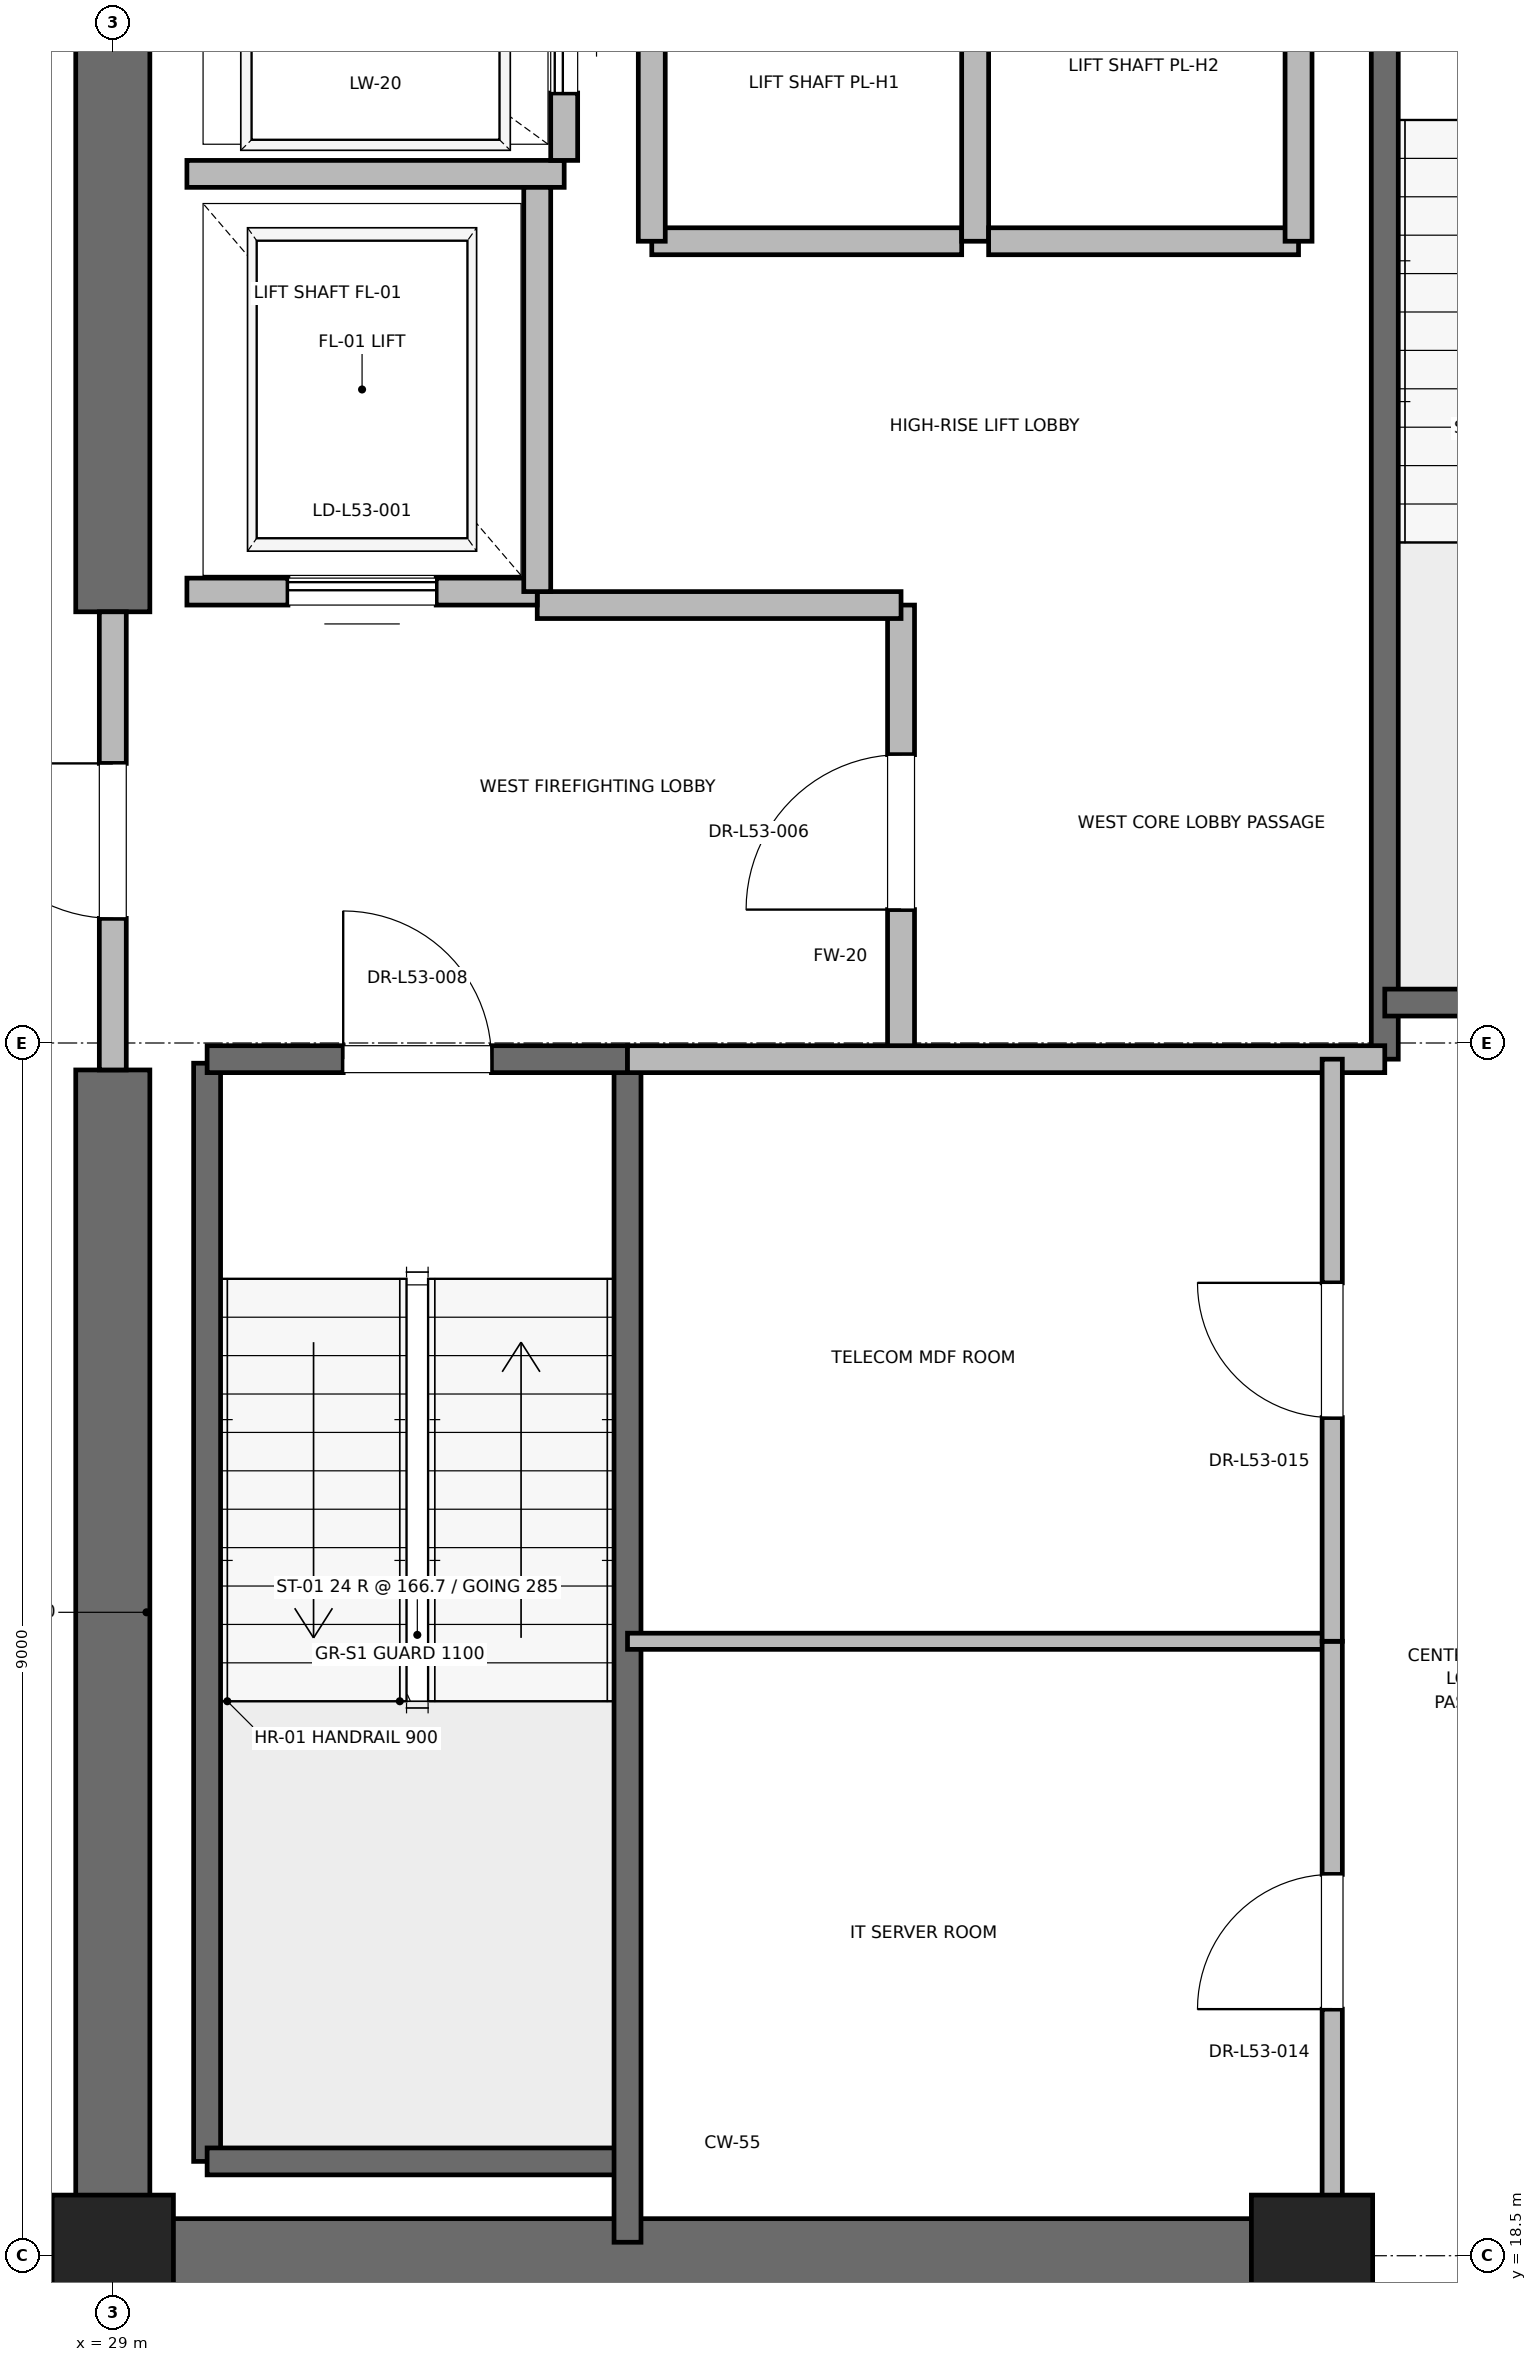
"""IFC4 building model, lengths in metres.
Left out: names, types, materials, properties, quantities, classifications, styles, units other than length and angle.
Written with IfcOpenShell. Run it as: python <this file> out.ifc"""

import sys

from ifc_helpers import new_model, si_unit, direction, frame, frame_2d, origin, origin_2d, place, context, subcontext, project, spatial, rectangle, extrude, element, fill, save


model = new_model("IFC4")
c1 = context("Model", 3, precision=1e-05, world=origin(), true_north=direction((0.0, 1.0)))
c2 = subcontext(c1, "Body", "Model", "MODEL_VIEW")
j1 = project(units=[si_unit("LENGTHUNIT", "METRE"), si_unit("PLANEANGLEUNIT", "RADIAN")], contexts=[c1])
p1 = place(None, origin())
s1 = spatial("IfcSite", under=j1, at=p1, CompositionType="ELEMENT")
p2 = place(p1, origin())
s2 = spatial("IfcBuilding", under=s1, at=p2, CompositionType="ELEMENT")
p3 = place(p2, frame((0.0, 0.0, 229.2)))
s3 = spatial("IfcBuildingStorey", under=s2, at=p3, CompositionType="ELEMENT", Elevation=229.2)
for number, where, z_axis, x_axis in (
    (1, (29.0, 18.5, 0.0), (0.0, 0.0, 1.0), (1.0, 0.0, 0.0)),
    (2, (37.9, 18.5, 0.0), (0.0, 0.0, 1.0), (1.0, 0.0, 0.0)),
):
    element("IfcColumn", number, at=place(p3, frame(where, z_axis=z_axis, x_axis=x_axis)), inside=s3, PredefinedType="PILASTER", context=c2, shape_type="SweptSolid", body=[
        extrude(rectangle(XDim=0.9, YDim=0.9, at=origin_2d()), origin(), (0.0, 0.0, 1.0), 4.0),
    ])
p4 = place(p3, frame((29.0, 18.5, 0.0), z_axis=(0.0, 0.0, 1.0), x_axis=(1.0, 0.0, 0.0)))
e3 = element("IfcWall", 3, at=p4, inside=s3, PredefinedType="SHEAR", context=c2, shape_type="SweptSolid", body=[
    extrude(rectangle(XDim=9.2, YDim=0.55, at=frame_2d((4.6, 0.0))), origin(), (0.0, 0.0, 1.0), 3.7),
])
p5 = place(p3, frame((29.0, 18.5, 0.0), z_axis=(0.0, 0.0, 1.0), x_axis=(0.0, 1.0, 0.0)))
e4 = element("IfcWall", 4, at=p5, inside=s3, PredefinedType="SHEAR", context=c2, shape_type="SweptSolid", body=[
    extrude(rectangle(XDim=8.8, YDim=0.55, at=frame_2d((4.4, 0.0))), origin(), (0.0, 0.0, 1.0), 3.7),
])
p6 = place(p3, frame((29.0, 30.7, 0.0), z_axis=(0.0, 0.0, 1.0), x_axis=(0.0, 1.0, 0.0)))
e5 = element("IfcWall", 5, at=p6, inside=s3, PredefinedType="SHEAR", context=c2, shape_type="SweptSolid", body=[
    extrude(rectangle(XDim=5.8, YDim=0.55, at=frame_2d((2.9, 0.0))), origin(), (0.0, 0.0, 1.0), 3.7),
])
p7 = place(p3, frame((29.7, 19.2, 0.0), z_axis=(0.0, 0.0, 1.0), x_axis=(0.0, 1.0, 0.0)))
e6 = element("IfcWall", 6, at=p7, inside=s3, PredefinedType="SOLIDWALL", context=c2, shape_type="SweptSolid", body=[
    extrude(rectangle(XDim=8.15, YDim=0.2, at=frame_2d((4.075, 0.0))), origin(), (0.0, 0.0, 1.0), 3.7),
])
p8 = place(p3, frame((29.7, 19.2, 0.0), z_axis=(0.0, 0.0, 1.0), x_axis=(1.0, 0.0, 0.0)))
e7 = element("IfcWall", 7, at=p8, inside=s3, PredefinedType="SOLIDWALL", context=c2, shape_type="SweptSolid", body=[
    extrude(rectangle(XDim=3.12, YDim=0.2, at=frame_2d((1.56, 0.0))), origin(), (0.0, 0.0, 1.0), 3.7),
])
p9 = place(p3, frame((32.82, 18.6, 0.0), z_axis=(0.0, 0.0, 1.0), x_axis=(0.0, 1.0, 0.0)))
e8 = element("IfcWall", 8, at=p9, inside=s3, PredefinedType="SOLIDWALL", context=c2, shape_type="SweptSolid", body=[
    extrude(rectangle(XDim=8.78, YDim=0.2, at=frame_2d((4.39, 0.0))), origin(), (0.0, 0.0, 1.0), 3.7),
])
p10 = place(p3, frame((29.7, 27.38, 0.0), z_axis=(0.0, 0.0, 1.0), x_axis=(1.0, 0.0, 0.0)))
e9 = element("IfcWall", 9, at=p10, inside=s3, PredefinedType="SOLIDWALL", context=c2, shape_type="SweptSolid", body=[
    extrude(rectangle(XDim=3.12, YDim=0.2, at=frame_2d((1.56, 0.0))), origin(), (0.0, 0.0, 1.0), 3.7),
])
p11 = place(p10, frame((1.01, 0.0, 0.0)))
e10 = element("IfcOpeningElement", 10, at=p11, cuts=e9, PredefinedType="OPENING", context=c2, shape_type="SweptSolid", body=[
    extrude(rectangle(XDim=1.1, YDim=2.15, at=frame_2d((0.55, 1.075))), frame((0.0, 0.1, 0.0), z_axis=(0.0, -1.0, 0.0), x_axis=(1.0, 0.0, 0.0)), (0.0, 0.0, 1.0), 0.2),
])
p12 = place(p3, frame((38.44, 27.38, 0.0), z_axis=(0.0, 0.0, 1.0), x_axis=(0.0, 1.0, 0.0)))
e11 = element("IfcWall", 11, at=p12, inside=s3, PredefinedType="SOLIDWALL", context=c2, shape_type="SweptSolid", body=[
    extrude(rectangle(XDim=8.87, YDim=0.2, at=frame_2d((4.435, 0.0))), origin(), (0.0, 0.0, 1.0), 3.7),
])
p13 = place(p3, frame((38.44, 27.8, 0.0), z_axis=(0.0, 0.0, 1.0), x_axis=(1.0, 0.0, 0.0)))
e12 = element("IfcWall", 12, at=p13, inside=s3, PredefinedType="SOLIDWALL", context=c2, shape_type="SweptSolid", body=[
    extrude(rectangle(XDim=3.32, YDim=0.2, at=frame_2d((1.66, 0.0))), origin(), (0.0, 0.0, 1.0), 3.7),
])
p14 = place(p3, frame((34.85, 27.38, 0.0), z_axis=(0.0, 0.0, 1.0), x_axis=(0.0, 1.0, 0.0)))
e13 = element("IfcWall", 13, at=p14, inside=s3, PredefinedType="PARTITIONING", context=c2, shape_type="SweptSolid", body=[
    extrude(rectangle(XDim=3.37, YDim=0.2, at=frame_2d((1.685, 0.0))), origin(), (0.0, 0.0, 1.0), 3.7),
])
p15 = place(p14, frame((1.11, 0.0, 0.0)))
e14 = element("IfcOpeningElement", 14, at=p15, cuts=e13, PredefinedType="OPENING", context=c2, shape_type="SweptSolid", body=[
    extrude(rectangle(XDim=1.15, YDim=2.2, at=frame_2d((0.575, 1.1))), frame((0.0, 0.1, 0.0), z_axis=(0.0, -1.0, 0.0), x_axis=(1.0, 0.0, 0.0)), (0.0, 0.0, 1.0), 0.2),
])
p16 = place(p3, frame((29.0, 27.3, 0.0), z_axis=(0.0, 0.0, 1.0), x_axis=(0.0, 1.0, 0.0)))
e15 = element("IfcWall", 15, at=p16, inside=s3, PredefinedType="PARTITIONING", context=c2, shape_type="SweptSolid", body=[
    extrude(rectangle(XDim=3.4, YDim=0.2, at=frame_2d((1.7, 0.0))), origin(), (0.0, 0.0, 1.0), 2.68),
])
p17 = place(p16, frame((1.125, 0.0, 0.0)))
e16 = element("IfcOpeningElement", 16, at=p17, cuts=e15, PredefinedType="OPENING", context=c2, shape_type="SweptSolid", body=[
    extrude(rectangle(XDim=1.15, YDim=2.2, at=frame_2d((0.575, 1.1))), frame((0.0, 0.1, 0.0), z_axis=(0.0, -1.0, 0.0), x_axis=(1.0, 0.0, 0.0)), (0.0, 0.0, 1.0), 0.2),
])
p18 = place(p3, frame((32.82, 27.38, 0.0), z_axis=(0.0, 0.0, 1.0), x_axis=(1.0, 0.0, 0.0)))
e17 = element("IfcWall", 17, at=p18, inside=s3, PredefinedType="PARTITIONING", context=c2, shape_type="SweptSolid", body=[
    extrude(rectangle(XDim=5.62, YDim=0.2, at=frame_2d((2.81, 0.0))), origin(), (0.0, 0.0, 1.0), 3.7),
])
p19 = place(p3, frame((32.15, 30.75, 0.0), z_axis=(0.0, 0.0, 1.0), x_axis=(1.0, 0.0, 0.0)))
e18 = element("IfcWall", 18, at=p19, inside=s3, PredefinedType="PARTITIONING", context=c2, shape_type="SweptSolid", body=[
    extrude(rectangle(XDim=2.7, YDim=0.2, at=frame_2d((1.35, 0.0))), origin(), (0.0, 0.0, 1.0), 3.7),
])
p20 = place(p3, frame((29.55, 30.85, 0.0), z_axis=(0.0, 0.0, 1.0), x_axis=(1.0, 0.0, 0.0)))
e19 = element("IfcWall", 19, at=p20, inside=s3, PredefinedType="SOLIDWALL", context=c2, shape_type="SweptSolid", body=[
    extrude(rectangle(XDim=2.6, YDim=0.2, at=frame_2d((1.3, 0.0))), origin(), (0.0, 0.0, 1.0), 2.68),
])
p21 = place(p20, frame((0.75, 0.0, 0.0)))
e20 = element("IfcOpeningElement", 20, at=p21, cuts=e19, PredefinedType="OPENING", context=c2, shape_type="SweptSolid", body=[
    extrude(rectangle(XDim=1.1, YDim=2.2, at=frame_2d((0.55, 1.1))), frame((0.0, 0.1, 0.0), z_axis=(0.0, -1.0, 0.0), x_axis=(1.0, 0.0, 0.0)), (0.0, 0.0, 1.0), 0.2),
])
p22 = place(p3, frame((29.55, 33.95, 0.0), z_axis=(0.0, 0.0, 1.0), x_axis=(1.0, 0.0, 0.0)))
e21 = element("IfcWall", 21, at=p22, inside=s3, PredefinedType="SOLIDWALL", context=c2, shape_type="SweptSolid", body=[
    extrude(rectangle(XDim=2.8, YDim=0.2, at=frame_2d((1.4, 0.0))), origin(), (0.0, 0.0, 1.0), 3.7),
])
p23 = place(p3, frame((32.15, 30.85, 0.0), z_axis=(0.0, 0.0, 1.0), x_axis=(0.0, 1.0, 0.0)))
e22 = element("IfcWall", 22, at=p23, inside=s3, PredefinedType="SOLIDWALL", context=c2, shape_type="SweptSolid", body=[
    extrude(rectangle(XDim=3.0, YDim=0.2, at=frame_2d((1.5, 0.0))), origin(), (0.0, 0.0, 1.0), 3.7),
])
p24 = place(p3, frame((32.35, 34.05, 0.0), z_axis=(0.0, 0.0, 1.0), x_axis=(0.0, 1.0, 0.0)))
e23 = element("IfcWall", 23, at=p24, inside=s3, PredefinedType="SOLIDWALL", context=c2, shape_type="SweptSolid", body=[
    extrude(rectangle(XDim=2.1, YDim=0.2, at=frame_2d((1.05, 0.0))), origin(), (0.0, 0.0, 1.0), 3.7),
])
p25 = place(p24, frame((0.5, 0.0, 0.0)))
e24 = element("IfcOpeningElement", 24, at=p25, cuts=e23, PredefinedType="OPENING", context=c2, shape_type="SweptSolid", body=[
    extrude(rectangle(XDim=1.1, YDim=2.2, at=frame_2d((0.55, 1.1))), frame((0.0, 0.1, 0.0), z_axis=(0.0, -1.0, 0.0), x_axis=(1.0, 0.0, 0.0)), (0.0, 0.0, 1.0), 0.2),
])
p26 = place(p3, frame((33.0, 33.45, 0.0), z_axis=(0.0, 0.0, 1.0), x_axis=(1.0, 0.0, 0.0)))
e25 = element("IfcWall", 25, at=p26, inside=s3, PredefinedType="SOLIDWALL", context=c2, shape_type="SweptSolid", body=[
    extrude(rectangle(XDim=2.3, YDim=0.2, at=frame_2d((1.15, 0.0))), origin(), (0.0, 0.0, 1.0), 3.7),
])
p27 = place(p3, frame((33.0, 36.05, 0.0), z_axis=(0.0, 0.0, 1.0), x_axis=(0.0, -1.0, 0.0)))
e26 = element("IfcWall", 26, at=p27, inside=s3, PredefinedType="SOLIDWALL", context=c2, shape_type="SweptSolid", body=[
    extrude(rectangle(XDim=2.6, YDim=0.2, at=frame_2d((1.3, 0.0))), origin(), (0.0, 0.0, 1.0), 3.7),
])
p28 = place(p3, frame((35.4, 33.45, 0.0), z_axis=(0.0, 0.0, 1.0), x_axis=(0.0, 1.0, 0.0)))
e27 = element("IfcWall", 27, at=p28, inside=s3, PredefinedType="SOLIDWALL", context=c2, shape_type="SweptSolid", body=[
    extrude(rectangle(XDim=2.6, YDim=0.2, at=frame_2d((1.3, 0.0))), origin(), (0.0, 0.0, 1.0), 2.68),
])
p29 = place(p3, frame((35.5, 33.45, 0.0), z_axis=(0.0, 0.0, 1.0), x_axis=(1.0, 0.0, 0.0)))
e28 = element("IfcWall", 28, at=p29, inside=s3, PredefinedType="SOLIDWALL", context=c2, shape_type="SweptSolid", body=[
    extrude(rectangle(XDim=2.3, YDim=0.2, at=frame_2d((1.15, 0.0))), origin(), (0.0, 0.0, 1.0), 3.7),
])
p30 = place(p3, frame((37.8, 33.45, 0.0), z_axis=(0.0, 0.0, 1.0), x_axis=(0.0, 1.0, 0.0)))
e29 = element("IfcWall", 29, at=p30, inside=s3, PredefinedType="SOLIDWALL", context=c2, shape_type="SweptSolid", body=[
    extrude(rectangle(XDim=2.6, YDim=0.2, at=frame_2d((1.3, 0.0))), origin(), (0.0, 0.0, 1.0), 2.68),
])
p31 = place(p3, frame((32.82, 23.06, 0.0), z_axis=(0.0, 0.0, 1.0), x_axis=(1.0, 0.0, 0.0)))
e30 = element("IfcWall", 30, at=p31, inside=s3, PredefinedType="PARTITIONING", context=c2, shape_type="SweptSolid", body=[
    extrude(rectangle(XDim=5.23, YDim=0.12, at=frame_2d((2.615, 0.0))), origin(), (0.0, 0.0, 1.0), 2.85),
])
p32 = place(p3, frame((38.05, 18.6, 0.0), z_axis=(0.0, 0.0, 1.0), x_axis=(0.0, 1.0, 0.0)))
e31 = element("IfcWall", 31, at=p32, inside=s3, PredefinedType="PARTITIONING", context=c2, shape_type="SweptSolid", body=[
    extrude(rectangle(XDim=4.46, YDim=0.15, at=frame_2d((2.23, 0.0))), origin(), (0.0, 0.0, 1.0), 2.68),
])
p33 = place(p32, frame((1.73, 0.0, 0.0)))
e32 = element("IfcOpeningElement", 32, at=p33, cuts=e31, PredefinedType="OPENING", context=c2, shape_type="SweptSolid", body=[
    extrude(rectangle(XDim=1.0, YDim=2.15, at=frame_2d((0.5, 1.075))), frame((0.0, 0.075, 0.0), z_axis=(0.0, -1.0, 0.0), x_axis=(1.0, 0.0, 0.0)), (0.0, 0.0, 1.0), 0.15),
])
p34 = place(p3, frame((38.05, 23.06, 0.0), z_axis=(0.0, 0.0, 1.0), x_axis=(0.0, 1.0, 0.0)))
e33 = element("IfcWall", 33, at=p34, inside=s3, PredefinedType="PARTITIONING", context=c2, shape_type="SweptSolid", body=[
    extrude(rectangle(XDim=4.32, YDim=0.15, at=frame_2d((2.16, 0.0))), origin(), (0.0, 0.0, 1.0), 2.85),
])
p35 = place(p34, frame((1.66, 0.0, 0.0)))
e34 = element("IfcOpeningElement", 34, at=p35, cuts=e33, PredefinedType="OPENING", context=c2, shape_type="SweptSolid", body=[
    extrude(rectangle(XDim=1.0, YDim=2.15, at=frame_2d((0.5, 1.075))), frame((0.0, 0.075, 0.0), z_axis=(0.0, -1.0, 0.0), x_axis=(1.0, 0.0, 0.0)), (0.0, 0.0, 1.0), 0.15),
])
p36 = place(p11, origin())
e35 = element("IfcDoor", 35, at=p36, inside=s3, OperationType="SINGLE_SWING_LEFT", PredefinedType="DOOR", context=c2, shape_type="SweptSolid", body=[
    extrude(rectangle(XDim=1.1, YDim=2.15, at=frame_2d((0.55, 1.075))), frame((0.0, 0.025, 0.0), z_axis=(0.0, -1.0, 0.0), x_axis=(1.0, 0.0, 0.0)), (0.0, 0.0, 1.0), 0.05),
])
fill(e10, e35)
p37 = place(p15, origin())
e36 = element("IfcDoor", 36, at=p37, inside=s3, OperationType="SINGLE_SWING_LEFT", PredefinedType="DOOR", context=c2, shape_type="SweptSolid", body=[
    extrude(rectangle(XDim=1.15, YDim=2.2, at=frame_2d((0.575, 1.1))), frame((0.0, 0.025, 0.0), z_axis=(0.0, -1.0, 0.0), x_axis=(1.0, 0.0, 0.0)), (0.0, 0.0, 1.0), 0.05),
])
fill(e14, e36)
p38 = place(p17, origin())
e37 = element("IfcDoor", 37, at=p38, inside=s3, OperationType="SINGLE_SWING_RIGHT", PredefinedType="DOOR", context=c2, shape_type="SweptSolid", body=[
    extrude(rectangle(XDim=1.15, YDim=2.2, at=frame_2d((0.575, 1.1))), frame((0.0, 0.025, 0.0), z_axis=(0.0, -1.0, 0.0), x_axis=(1.0, 0.0, 0.0)), (0.0, 0.0, 1.0), 0.05),
])
fill(e16, e37)
p39 = place(p21, origin())
e38 = element("IfcDoor", 38, at=p39, inside=s3, OperationType="SLIDING_TO_RIGHT", PredefinedType="DOOR", context=c2, shape_type="SweptSolid", body=[
    extrude(rectangle(XDim=1.1, YDim=2.2, at=frame_2d((0.55, 1.1))), frame((0.0, 0.025, 0.0), z_axis=(0.0, -1.0, 0.0), x_axis=(1.0, 0.0, 0.0)), (0.0, 0.0, 1.0), 0.05),
])
fill(e20, e38)
p40 = place(p25, origin())
e39 = element("IfcDoor", 39, at=p40, inside=s3, OperationType="SLIDING_TO_RIGHT", PredefinedType="DOOR", context=c2, shape_type="SweptSolid", body=[
    extrude(rectangle(XDim=1.1, YDim=2.2, at=frame_2d((0.55, 1.1))), frame((0.0, 0.025, 0.0), z_axis=(0.0, -1.0, 0.0), x_axis=(1.0, 0.0, 0.0)), (0.0, 0.0, 1.0), 0.05),
])
fill(e24, e39)
p41 = place(p33, origin())
e40 = element("IfcDoor", 40, at=p41, inside=s3, OperationType="SINGLE_SWING_LEFT", PredefinedType="DOOR", context=c2, shape_type="SweptSolid", body=[
    extrude(rectangle(XDim=1.0, YDim=2.15, at=frame_2d((0.5, 1.075))), frame((0.0, 0.025, 0.0), z_axis=(0.0, -1.0, 0.0), x_axis=(1.0, 0.0, 0.0)), (0.0, 0.0, 1.0), 0.05),
])
fill(e32, e40)
p42 = place(p35, origin())
e41 = element("IfcDoor", 41, at=p42, inside=s3, OperationType="SINGLE_SWING_RIGHT", PredefinedType="DOOR", context=c2, shape_type="SweptSolid", body=[
    extrude(rectangle(XDim=1.0, YDim=2.15, at=frame_2d((0.5, 1.075))), frame((0.0, 0.025, 0.0), z_axis=(0.0, -1.0, 0.0), x_axis=(1.0, 0.0, 0.0)), (0.0, 0.0, 1.0), 0.05),
])
fill(e34, e41)
save(model, sys.argv[1])
